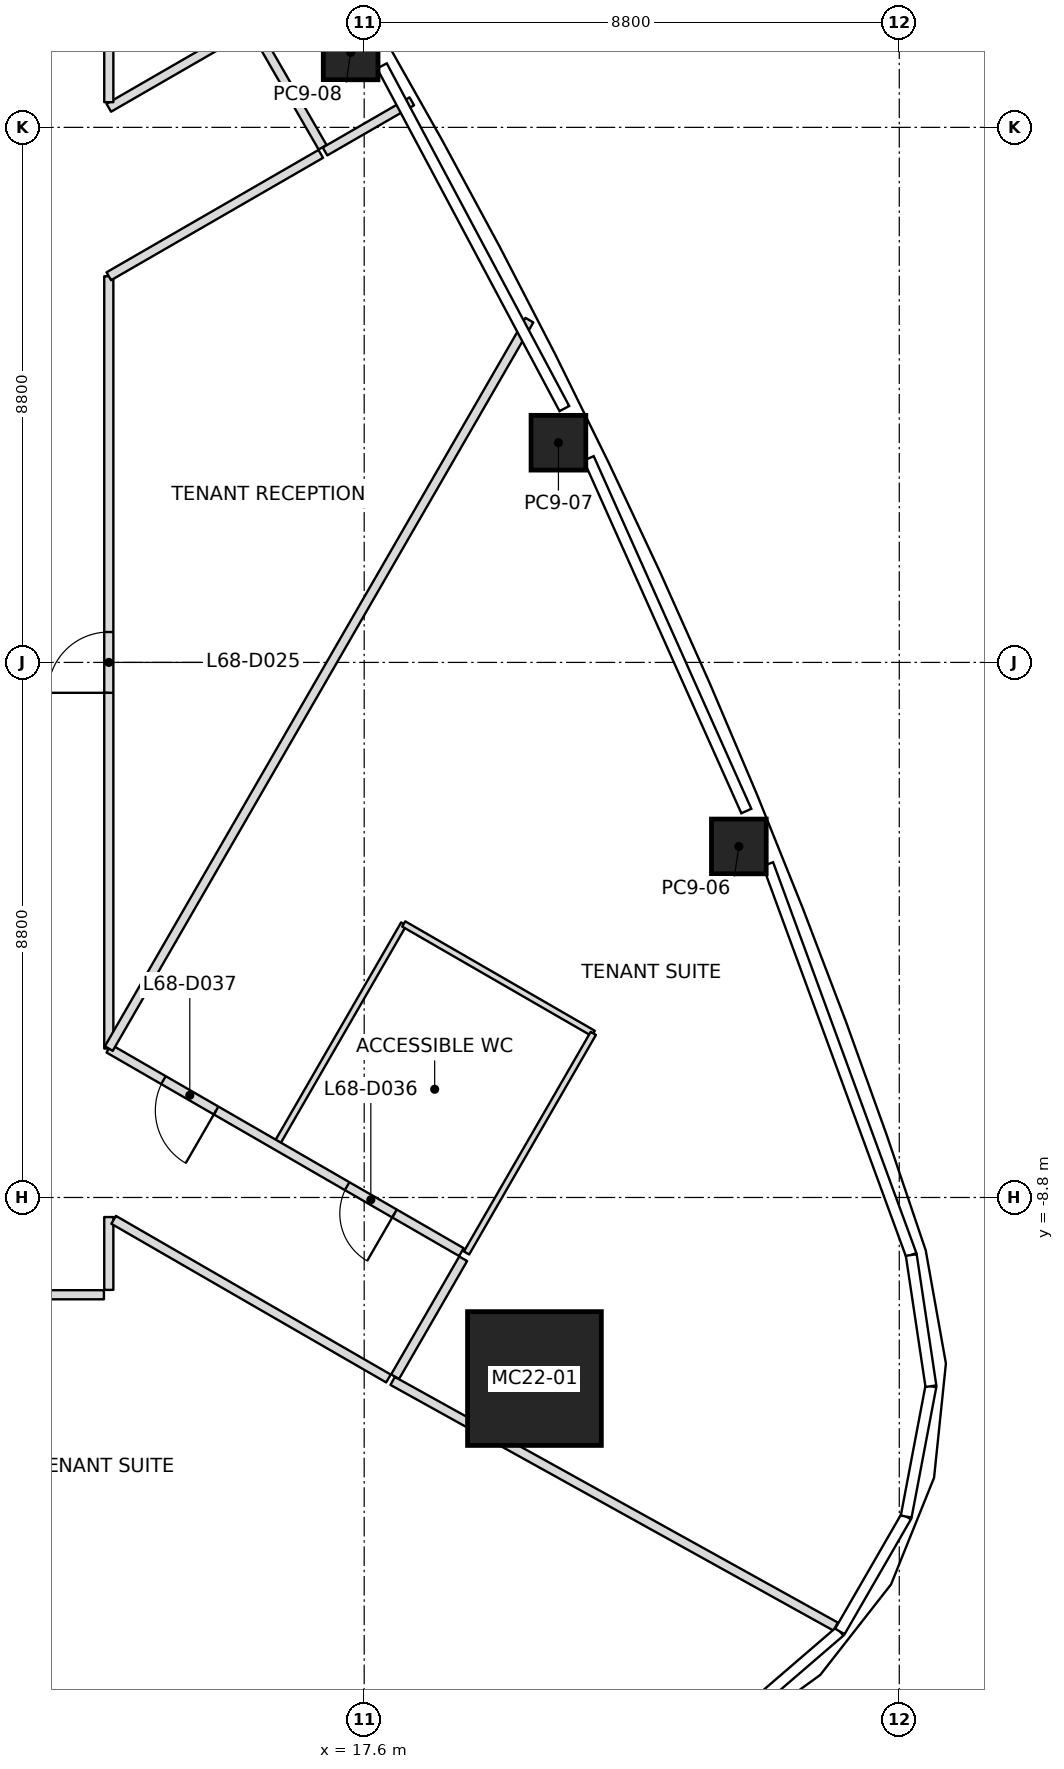
"""IFC4 building model, lengths in metres.
Left out: names, types, materials, properties, quantities, classifications, styles, units other than length and angle.
Written with IfcOpenShell. Run it as: python <this file> out.ifc"""

import sys

from ifc_helpers import new_model, si_unit, direction, frame, frame_2d, origin, origin_2d, place, context, subcontext, project, spatial, rectangle, extrude, element, fill, save


model = new_model("IFC4")
c1 = context("Model", 3, precision=1e-05, world=origin(), true_north=direction((0.0, 1.0)))
c2 = subcontext(c1, "Body", "Model", "MODEL_VIEW")
j1 = project(units=[si_unit("LENGTHUNIT", "METRE"), si_unit("PLANEANGLEUNIT", "RADIAN")], contexts=[c1])
p1 = place(None, origin())
s1 = spatial("IfcSite", under=j1, at=p1, CompositionType="ELEMENT")
p2 = place(p1, origin())
s2 = spatial("IfcBuilding", under=s1, at=p2, CompositionType="ELEMENT")
p3 = place(p2, frame((0.0, 0.0, 299.0)))
s3 = spatial("IfcBuildingStorey", under=s2, at=p3, CompositionType="ELEMENT", Elevation=299.0)
p4 = place(p3, frame((20.4, -11.778, 0.0), z_axis=(-0.027695790401, 0.015983033227, 0.999488612163), x_axis=(0.999616398022, 0.00044283261, 0.027692249912)))
e1 = element("IfcColumn", 1, at=p4, inside=s3, PredefinedType="COLUMN", context=c2, shape_type="SweptSolid", body=[
    extrude(rectangle(XDim=2.2, YDim=2.2, at=origin_2d()), origin(), (0.0, 0.0, 1.0), 4.002),
])
p5 = place(p3, frame((23.762, -3.027, 0.0), z_axis=(-0.017696558482, 0.009885663704, 0.999794531627), x_axis=(-0.376217086223, 0.926396492836, -0.015819042166)))
e2 = element("IfcColumn", 2, at=p5, inside=s3, PredefinedType="COLUMN", context=c2, shape_type="SweptSolid", body=[
    extrude(rectangle(XDim=0.9, YDim=0.9, at=origin_2d()), origin(), (0.0, 0.0, 1.0), 4.001),
])
p6 = place(p3, frame((20.795, 3.613, 0.0), z_axis=(-0.014097691364, 0.002013955909, 0.999898594398), x_axis=(-0.439136769139, 0.898384596408, -0.008000932944)))
e3 = element("IfcColumn", 3, at=p6, inside=s3, PredefinedType="COLUMN", context=c2, shape_type="SweptSolid", body=[
    extrude(rectangle(XDim=0.9, YDim=0.9, at=origin_2d()), origin(), (0.0, 0.0, 1.0), 4.0),
])
p7 = place(p3, frame((17.377, 10.033, 0.0), z_axis=(-0.009887049298, -0.00573692984, 0.999934664812), x_axis=(-0.499975560967, 0.866039512843, 2.5126546e-05)))
e4 = element("IfcColumn", 4, at=p7, inside=s3, PredefinedType="COLUMN", context=c2, shape_type="SweptSolid", body=[
    extrude(rectangle(XDim=0.9, YDim=0.9, at=origin_2d()), origin(), (0.0, 0.0, 1.0), 4.0),
])
p8 = place(p3, frame((20.317, 5.629, 0.0), z_axis=(0.0, 0.0, 1.0), x_axis=(-0.500011183772, -0.866018946734, 0.0)))
e5 = element("IfcWall", 5, at=p8, inside=s3, PredefinedType="PARTITIONING", context=c2, shape_type="SweptSolid", body=[
    extrude(rectangle(XDim=13.834, YDim=0.15, at=frame_2d((6.917, 0.0))), origin(), (0.0, 0.0, 1.0), 3.234),
])
p9 = place(p3, frame((16.956, 8.404, 0.0), z_axis=(0.0, 0.0, 1.0), x_axis=(0.865983361098, 0.500072813, 0.0)))
e6 = element("IfcWall", 6, at=p9, inside=s3, PredefinedType="PARTITIONING", context=c2, shape_type="SweptSolid", body=[
    extrude(rectangle(XDim=1.649, YDim=0.15, at=frame_2d((0.824, 0.0))), origin(), (0.0, 0.0, 1.0), 3.234),
])
p10 = place(p3, frame((18.068, -11.817, 0.0), z_axis=(0.0, 0.0, 1.0), x_axis=(0.874521972624, -0.484985896081, 0.0)))
e7 = element("IfcWall", 7, at=p10, inside=s3, PredefinedType="PARTITIONING", context=c2, shape_type="SweptSolid", body=[
    extrude(rectangle(XDim=8.331, YDim=0.15, at=frame_2d((4.166, 0.0))), origin(), (0.0, 0.0, 1.0), 3.234),
])
p11 = place(p3, frame((1.2, -10.4, 0.0), z_axis=(0.0, 0.0, 1.0), x_axis=(1.0, 0.0, 0.0)))
e8 = element("IfcWall", 8, at=p11, inside=s3, PredefinedType="PARTITIONING", context=c2, shape_type="SweptSolid", body=[
    extrude(rectangle(XDim=12.12, YDim=0.15, at=frame_2d((6.06, 0.0))), origin(), (0.0, 0.0, 1.0), 3.393),
])
p12 = place(p11, frame((2.05, 0.0, 0.0)))
e9 = element("IfcOpeningElement", 9, at=p12, cuts=e8, PredefinedType="OPENING", context=c2, shape_type="SweptSolid", body=[
    extrude(rectangle(XDim=0.9, YDim=2.1, at=frame_2d((0.45, 1.05))), frame((0.0, 0.075, 0.0), z_axis=(0.0, -1.0, 0.0), x_axis=(1.0, 0.0, 0.0)), (0.0, 0.0, 1.0), 0.15),
])
p13 = place(p11, frame((8.15, 0.0, 0.0)))
e10 = element("IfcOpeningElement", 10, at=p13, cuts=e8, PredefinedType="OPENING", context=c2, shape_type="SweptSolid", body=[
    extrude(rectangle(XDim=1.0, YDim=2.1, at=frame_2d((0.5, 1.05))), frame((0.0, 0.075, 0.0), z_axis=(0.0, -1.0, 0.0), x_axis=(1.0, 0.0, 0.0)), (0.0, 0.0, 1.0), 0.15),
])
p14 = place(p3, frame((13.4, -10.32, 0.0), z_axis=(0.0, 0.0, 1.0), x_axis=(0.0, 1.0, 0.0)))
e11 = element("IfcWall", 11, at=p14, inside=s3, PredefinedType="PARTITIONING", context=c2, shape_type="SweptSolid", body=[
    extrude(rectangle(XDim=1.198, YDim=0.15, at=frame_2d((0.599, 0.0))), origin(), (0.0, 0.0, 1.0), 3.233),
])
p15 = place(p3, frame((13.479, -9.168, 0.0), z_axis=(0.0, 0.0, 1.0), x_axis=(0.866043800775, -0.499968134123, 0.0)))
e12 = element("IfcWall", 12, at=p15, inside=s3, PredefinedType="PARTITIONING", context=c2, shape_type="SweptSolid", body=[
    extrude(rectangle(XDim=5.219, YDim=0.15, at=frame_2d((2.609, 0.0))), origin(), (0.0, 0.0, 1.0), 3.233),
])
p16 = place(p3, frame((13.4, -6.351, 0.0), z_axis=(0.0, 0.0, 1.0), x_axis=(0.0, 1.0, 0.0)))
e13 = element("IfcWall", 13, at=p16, inside=s3, PredefinedType="PARTITIONING", context=c2, shape_type="SweptSolid", body=[
    extrude(rectangle(XDim=12.702, YDim=0.15, at=frame_2d((6.351, 0.0))), origin(), (0.0, 0.0, 1.0), 3.317),
])
p17 = place(p16, frame((5.851, 0.0, 0.0)))
e14 = element("IfcOpeningElement", 14, at=p17, cuts=e13, PredefinedType="OPENING", context=c2, shape_type="SweptSolid", body=[
    extrude(rectangle(XDim=1.0, YDim=2.1, at=frame_2d((0.5, 1.05))), frame((0.0, 0.075, 0.0), z_axis=(0.0, -1.0, 0.0), x_axis=(1.0, 0.0, 0.0)), (0.0, 0.0, 1.0), 0.15),
])
p18 = place(p3, frame((13.4, 6.351, 0.0), z_axis=(0.0, 0.0, 1.0), x_axis=(0.866040157966, 0.499974444137, 0.0)))
e15 = element("IfcWall", 15, at=p18, inside=s3, PredefinedType="PARTITIONING", context=c2, shape_type="SweptSolid", body=[
    extrude(rectangle(XDim=4.026, YDim=0.15, at=frame_2d((2.013, 0.0))), origin(), (0.0, 0.0, 1.0), 3.45),
])
p19 = place(p3, frame((19.199, -9.699, 0.0), z_axis=(0.0, 0.0, 1.0), x_axis=(-0.866028933908, 0.499993885596, 0.0)))
e16 = element("IfcWall", 16, at=p19, inside=s3, PredefinedType="PARTITIONING", context=c2, shape_type="SweptSolid", body=[
    extrude(rectangle(XDim=6.696, YDim=0.15, at=frame_2d((3.348, 0.0))), origin(), (0.0, 0.0, 1.0), 3.247),
])
p20 = place(p19, frame((1.27, 0.0, 0.0)))
e17 = element("IfcOpeningElement", 17, at=p20, cuts=e16, PredefinedType="OPENING", context=c2, shape_type="SweptSolid", body=[
    extrude(rectangle(XDim=0.9, YDim=2.1, at=frame_2d((0.45, 1.05))), frame((0.0, 0.075, 0.0), z_axis=(0.0, -1.0, 0.0), x_axis=(1.0, 0.0, 0.0)), (0.0, 0.0, 1.0), 0.15),
])
p21 = place(p19, frame((4.658, 0.0, 0.0)))
e18 = element("IfcOpeningElement", 18, at=p21, cuts=e16, PredefinedType="OPENING", context=c2, shape_type="SweptSolid", body=[
    extrude(rectangle(XDim=1.0, YDim=2.1, at=frame_2d((0.5, 1.05))), frame((0.0, 0.075, 0.0), z_axis=(0.0, -1.0, 0.0), x_axis=(1.0, 0.0, 0.0)), (0.0, 0.0, 1.0), 0.15),
])
p22 = place(p3, frame((15.613, 10.4, 0.0), z_axis=(0.0, 0.0, 1.0), x_axis=(-0.866036056452, -0.499981548585, 0.0)))
e19 = element("IfcWall", 19, at=p22, inside=s3, PredefinedType="PARTITIONING", context=c2, shape_type="SweptSolid", body=[
    extrude(rectangle(XDim=2.556, YDim=0.15, at=frame_2d((1.278, 0.0))), origin(), (0.0, 0.0, 1.0), 3.45),
])
p23 = place(p3, frame((13.4, 9.214, 0.0), z_axis=(0.0, 0.0, 1.0), x_axis=(0.0, 1.0, 0.0)))
e20 = element("IfcWall", 20, at=p23, inside=s3, PredefinedType="PARTITIONING", context=c2, shape_type="SweptSolid", body=[
    extrude(rectangle(XDim=1.106, YDim=0.15, at=frame_2d((0.553, 0.0))), origin(), (0.0, 0.0, 1.0), 3.45),
])
p24 = place(p3, frame((16.916, 8.473, 0.0), z_axis=(0.0, 0.0, 1.0), x_axis=(-0.500030632641, 0.866007717299, 0.0)))
e21 = element("IfcWall", 21, at=p24, inside=s3, PredefinedType="PARTITIONING", context=c2, shape_type="SweptSolid", body=[
    extrude(rectangle(XDim=2.24, YDim=0.15, at=frame_2d((1.12, 0.0))), origin(), (0.0, 0.0, 1.0), 3.45),
])
p25 = place(p3, frame((18.108, -11.748, 0.0), z_axis=(0.0, 0.0, 1.0), x_axis=(0.49994888933, 0.866054910533, 0.0)))
e22 = element("IfcWall", 22, at=p25, inside=s3, PredefinedType="PARTITIONING", context=c2, shape_type="SweptSolid", body=[
    extrude(rectangle(XDim=2.24, YDim=0.15, at=frame_2d((1.12, 0.0))), origin(), (0.0, 0.0, 1.0), 3.233),
])
p26 = place(p3, frame((16.165, -7.913, 0.0), z_axis=(0.0, 0.0, 1.0), x_axis=(0.500036655653, 0.866004239599, 0.0)))
e23 = element("IfcWall", 23, at=p26, inside=s3, PredefinedType="PARTITIONING", context=c2, shape_type="SweptSolid", body=[
    extrude(rectangle(XDim=4.17, YDim=0.1, at=frame_2d((2.085, 0.0))), origin(), (0.0, 0.0, 1.0), 3.45),
])
p27 = place(p3, frame((18.25, -4.302, 0.0), z_axis=(0.0, 0.0, 1.0), x_axis=(0.866018442252, -0.500012057535, 0.0)))
e24 = element("IfcWall", 24, at=p27, inside=s3, PredefinedType="PARTITIONING", context=c2, shape_type="SweptSolid", body=[
    extrude(rectangle(XDim=3.6, YDim=0.1, at=frame_2d((1.8, 0.0))), origin(), (0.0, 0.0, 1.0), 3.443),
])
p28 = place(p3, frame((21.368, -6.102, 0.0), z_axis=(0.0, 0.0, 1.0), x_axis=(-0.499992746786, -0.866029591389, 0.0)))
e25 = element("IfcWall", 25, at=p28, inside=s3, PredefinedType="PARTITIONING", context=c2, shape_type="SweptSolid", body=[
    extrude(rectangle(XDim=4.17, YDim=0.1, at=frame_2d((2.085, 0.0))), origin(), (0.0, 0.0, 1.0), 3.45),
])
p29 = place(p17, origin())
e26 = element("IfcDoor", 26, at=p29, inside=s3, OperationType="SINGLE_SWING_RIGHT", PredefinedType="DOOR", context=c2, shape_type="SweptSolid", body=[
    extrude(rectangle(XDim=1.0, YDim=2.1, at=frame_2d((0.5, 1.05))), frame((0.0, 0.025, 0.0), z_axis=(0.0, -1.0, 0.0), x_axis=(1.0, 0.0, 0.0)), (0.0, 0.0, 1.0), 0.05),
])
fill(e14, e26)
p30 = place(p20, origin())
e27 = element("IfcDoor", 27, at=p30, inside=s3, OperationType="SINGLE_SWING_LEFT", PredefinedType="DOOR", context=c2, shape_type="SweptSolid", body=[
    extrude(rectangle(XDim=0.9, YDim=2.1, at=frame_2d((0.45, 1.05))), frame((0.0, 0.025, 0.0), z_axis=(0.0, -1.0, 0.0), x_axis=(1.0, 0.0, 0.0)), (0.0, 0.0, 1.0), 0.05),
])
fill(e17, e27)
p31 = place(p21, origin())
e28 = element("IfcDoor", 28, at=p31, inside=s3, OperationType="SINGLE_SWING_RIGHT", PredefinedType="DOOR", context=c2, shape_type="SweptSolid", body=[
    extrude(rectangle(XDim=1.0, YDim=2.1, at=frame_2d((0.5, 1.05))), frame((0.0, 0.025, 0.0), z_axis=(0.0, -1.0, 0.0), x_axis=(1.0, 0.0, 0.0)), (0.0, 0.0, 1.0), 0.05),
])
fill(e18, e28)
save(model, sys.argv[1])
